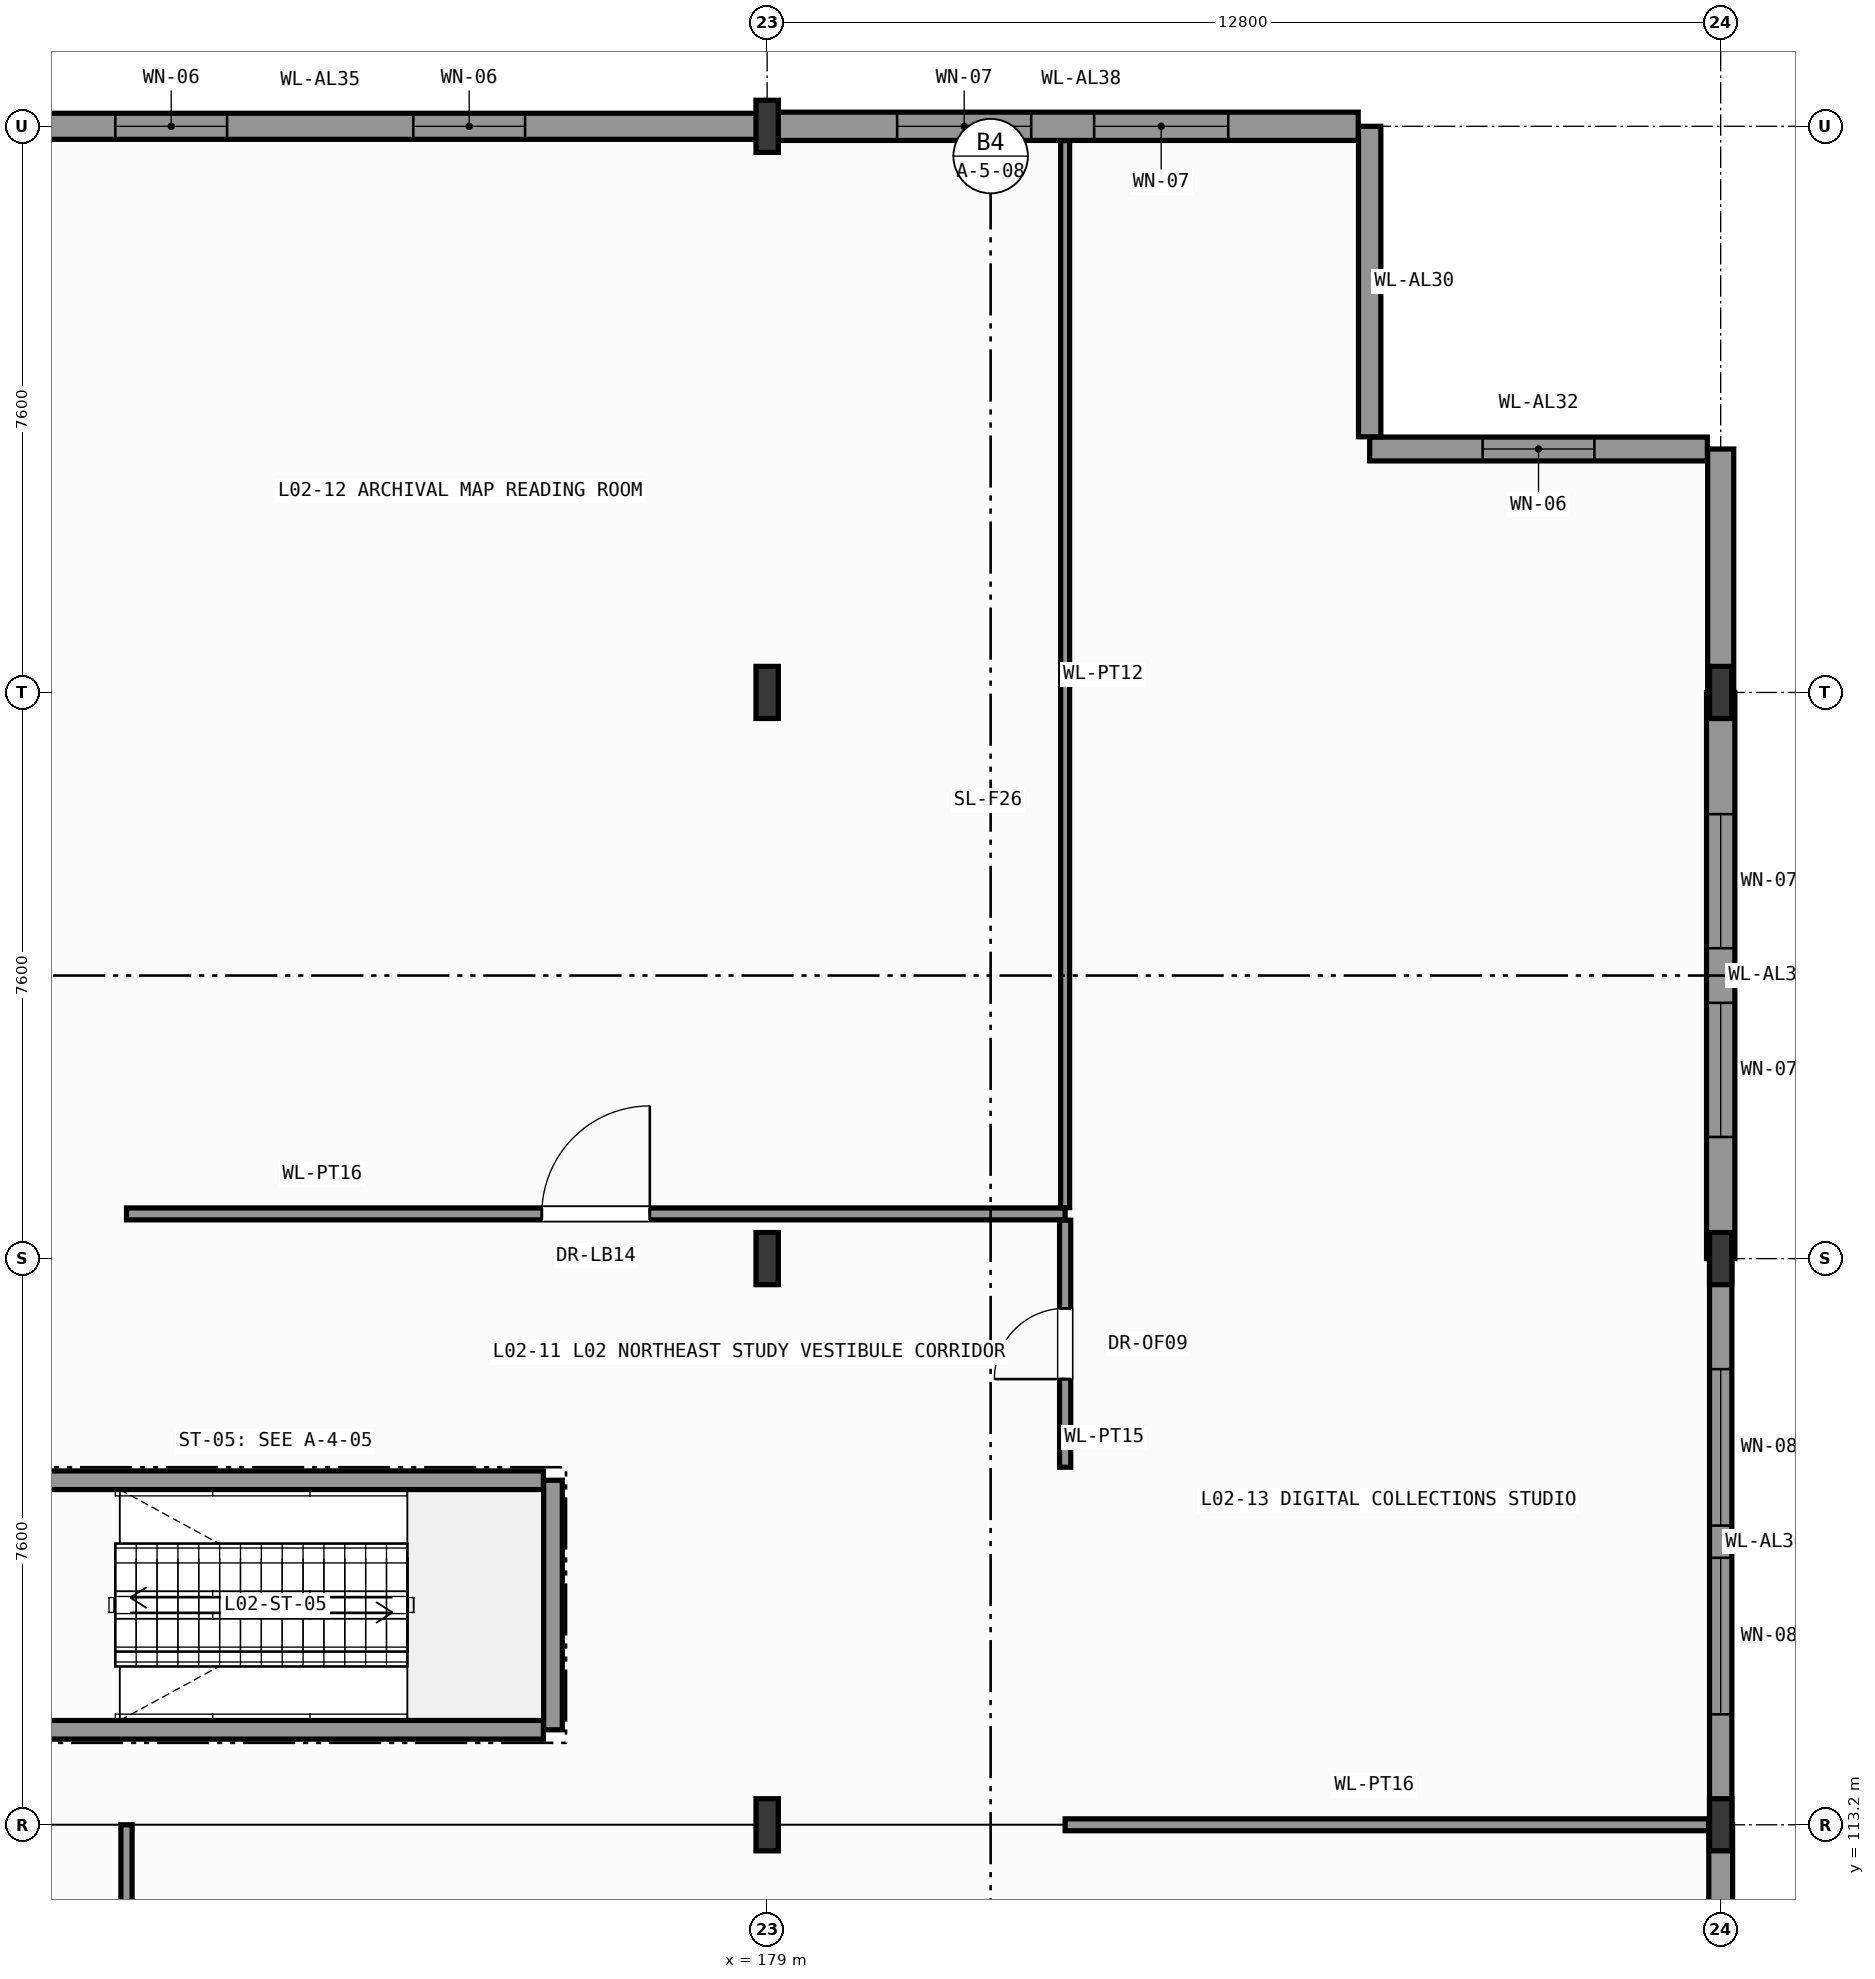
"""IFC4 building model, lengths in metres.
Left out: names, types, materials, properties, quantities, classifications, styles, units other than length and angle.
Written with IfcOpenShell. Run it as: python <this file> out.ifc"""

import sys

from ifc_helpers import new_model, si_unit, direction, frame, frame_2d, origin, origin_2d, place, context, subcontext, project, spatial, rectangle, i_section, extrude, element, fill, save


model = new_model("IFC4")
c1 = context("Model", 3, precision=1e-05, world=origin(), true_north=direction((0.0, 1.0)))
c2 = subcontext(c1, "Body", "Model", "MODEL_VIEW")
j1 = project(units=[si_unit("LENGTHUNIT", "METRE"), si_unit("PLANEANGLEUNIT", "RADIAN")], contexts=[c1])
p1 = place(None, origin())
s1 = spatial("IfcSite", under=j1, at=p1, CompositionType="ELEMENT")
p2 = place(p1, origin())
s2 = spatial("IfcBuilding", under=s1, at=p2, CompositionType="ELEMENT")
p3 = place(p2, frame((0.0, 0.0, 7.8)))
s3 = spatial("IfcBuildingStorey", under=s2, at=p3, CompositionType="ELEMENT", Elevation=7.8)
for number, where, z_axis, x_axis in (
    (1, (179.0, 113.2, 0.0), (0.0, 0.0, 1.0), (1.0, 0.0, 0.0)),
    (2, (179.0, 120.8, 0.0), (0.0, 0.0, 1.0), (1.0, 0.0, 0.0)),
    (3, (179.0, 128.4, 0.0), (0.0, 0.0, 1.0), (1.0, 0.0, 0.0)),
    (4, (179.0, 136.0, 0.0), (0.0, 0.0, 1.0), (1.0, 0.0, 0.0)),
    (5, (191.8, 113.2, 0.0), (0.0, 0.0, 1.0), (1.0, 0.0, 0.0)),
    (6, (191.8, 120.8, 0.0), (0.0, 0.0, 1.0), (1.0, 0.0, 0.0)),
    (7, (191.8, 128.4, 0.0), (0.0, 0.0, 1.0), (1.0, 0.0, 0.0)),
):
    element("IfcColumn", number, at=place(p3, frame(where, z_axis=z_axis, x_axis=x_axis)), inside=s3, PredefinedType="COLUMN", context=c2, shape_type="SweptSolid", body=[
        extrude(i_section(OverallWidth=0.3, OverallDepth=0.7, WebThickness=0.017, FlangeThickness=0.032, FilletRadius=0.027, at=origin_2d()), origin(), (0.0, 0.0, 1.0), 5.4),
    ])
p4 = place(p3, frame((191.8, 113.2, 0.0), z_axis=(0.0, 0.0, 1.0), x_axis=(0.0, -1.0, 0.0)))
e8 = element("IfcWall", 8, at=p4, inside=s3, PredefinedType="SOLIDWALL", context=c2, shape_type="SweptSolid", body=[
    extrude(rectangle(XDim=7.6, YDim=0.32, at=frame_2d((3.8, 0.0))), origin(), (0.0, 0.0, 1.0), 4.815),
])
p5 = place(p4, frame((1.783, 0.0, 0.95)))
e9 = element("IfcOpeningElement", 9, at=p5, cuts=e8, PredefinedType="OPENING", context=c2, shape_type="SweptSolid", body=[
    extrude(rectangle(XDim=1.5, YDim=2.4, at=frame_2d((0.75, 1.2))), frame((0.0, 0.17, 0.0), z_axis=(0.0, -1.0, 0.0), x_axis=(1.0, 0.0, 0.0)), (0.0, 0.0, 1.0), 0.34),
])
p6 = place(p4, frame((4.317, 0.0, 0.95)))
e10 = element("IfcOpeningElement", 10, at=p6, cuts=e8, PredefinedType="OPENING", context=c2, shape_type="SweptSolid", body=[
    extrude(rectangle(XDim=1.5, YDim=2.4, at=frame_2d((0.75, 1.2))), frame((0.0, 0.17, 0.0), z_axis=(0.0, -1.0, 0.0), x_axis=(1.0, 0.0, 0.0)), (0.0, 0.0, 1.0), 0.34),
])
p7 = place(p3, frame((191.8, 120.8, 0.0), z_axis=(0.0, 0.0, 1.0), x_axis=(0.0, -1.0, 0.0)))
e11 = element("IfcWall", 11, at=p7, inside=s3, PredefinedType="SOLIDWALL", context=c2, shape_type="SweptSolid", body=[
    extrude(rectangle(XDim=7.6, YDim=0.3, at=frame_2d((3.8, 0.0))), origin(), (0.0, 0.0, 1.0), 4.815),
])
p8 = place(p7, frame((1.483, 0.0, 0.95)))
e12 = element("IfcOpeningElement", 12, at=p8, cuts=e11, PredefinedType="OPENING", context=c2, shape_type="SweptSolid", body=[
    extrude(rectangle(XDim=2.1, YDim=2.8, at=frame_2d((1.05, 1.4))), frame((0.0, 0.16, 0.0), z_axis=(0.0, -1.0, 0.0), x_axis=(1.0, 0.0, 0.0)), (0.0, 0.0, 1.0), 0.32),
])
p9 = place(p7, frame((4.017, 0.0, 0.95)))
e13 = element("IfcOpeningElement", 13, at=p9, cuts=e11, PredefinedType="OPENING", context=c2, shape_type="SweptSolid", body=[
    extrude(rectangle(XDim=2.1, YDim=2.8, at=frame_2d((1.05, 1.4))), frame((0.0, 0.16, 0.0), z_axis=(0.0, -1.0, 0.0), x_axis=(1.0, 0.0, 0.0)), (0.0, 0.0, 1.0), 0.32),
])
p10 = place(p3, frame((191.8, 128.4, 0.0), z_axis=(0.0, 0.0, 1.0), x_axis=(0.0, -1.0, 0.0)))
e14 = element("IfcWall", 14, at=p10, inside=s3, PredefinedType="SOLIDWALL", context=c2, shape_type="SweptSolid", body=[
    extrude(rectangle(XDim=7.6, YDim=0.38, at=frame_2d((3.8, 0.0))), origin(), (0.0, 0.0, 1.0), 4.815),
])
p11 = place(p10, frame((1.633, 0.0, 0.95)))
e15 = element("IfcOpeningElement", 15, at=p11, cuts=e14, PredefinedType="OPENING", context=c2, shape_type="SweptSolid", body=[
    extrude(rectangle(XDim=1.8, YDim=2.6, at=frame_2d((0.9, 1.3))), frame((0.0, 0.2, 0.0), z_axis=(0.0, -1.0, 0.0), x_axis=(1.0, 0.0, 0.0)), (0.0, 0.0, 1.0), 0.4),
])
p12 = place(p10, frame((4.167, 0.0, 0.95)))
e16 = element("IfcOpeningElement", 16, at=p12, cuts=e14, PredefinedType="OPENING", context=c2, shape_type="SweptSolid", body=[
    extrude(rectangle(XDim=1.8, YDim=2.6, at=frame_2d((0.9, 1.3))), frame((0.0, 0.2, 0.0), z_axis=(0.0, -1.0, 0.0), x_axis=(1.0, 0.0, 0.0)), (0.0, 0.0, 1.0), 0.4),
])
p13 = place(p3, frame((191.8, 131.668, 0.0), z_axis=(0.0, 0.0, 1.0), x_axis=(0.0, -1.0, 0.0)))
e17 = element("IfcWall", 17, at=p13, inside=s3, PredefinedType="SOLIDWALL", context=c2, shape_type="SweptSolid", body=[
    extrude(rectangle(XDim=3.268, YDim=0.35, at=frame_2d((1.634, 0.0))), origin(), (0.0, 0.0, 1.0), 5.15),
])
p14 = place(p3, frame((187.088, 131.668, 0.0), z_axis=(0.0, 0.0, 1.0), x_axis=(1.0, 0.0, 0.0)))
e18 = element("IfcWall", 18, at=p14, inside=s3, PredefinedType="SOLIDWALL", context=c2, shape_type="SweptSolid", body=[
    extrude(rectangle(XDim=4.533, YDim=0.32, at=frame_2d((2.267, 0.0))), origin(), (0.0, 0.0, 1.0), 5.15),
])
p15 = place(p14, frame((1.517, 0.0, 0.95)))
e19 = element("IfcOpeningElement", 19, at=p15, cuts=e18, PredefinedType="OPENING", context=c2, shape_type="SweptSolid", body=[
    extrude(rectangle(XDim=1.5, YDim=2.4, at=frame_2d((0.75, 1.2))), frame((0.0, 0.17, 0.0), z_axis=(0.0, -1.0, 0.0), x_axis=(1.0, 0.0, 0.0)), (0.0, 0.0, 1.0), 0.34),
])
p16 = place(p3, frame((187.088, 136.0, 0.0), z_axis=(0.0, 0.0, 1.0), x_axis=(0.0, -1.0, 0.0)))
e20 = element("IfcWall", 20, at=p16, inside=s3, PredefinedType="SOLIDWALL", context=c2, shape_type="SweptSolid", body=[
    extrude(rectangle(XDim=4.168, YDim=0.3, at=frame_2d((2.084, 0.0))), origin(), (0.0, 0.0, 1.0), 5.15),
])
p17 = place(p3, frame((179.0, 136.0, 0.0), z_axis=(0.0, 0.0, 1.0), x_axis=(1.0, 0.0, 0.0)))
e21 = element("IfcWall", 21, at=p17, inside=s3, PredefinedType="SOLIDWALL", context=c2, shape_type="SweptSolid", body=[
    extrude(rectangle(XDim=7.934, YDim=0.38, at=frame_2d((3.967, 0.0))), origin(), (0.0, 0.0, 1.0), 5.15),
])
p18 = place(p17, frame((1.745, 0.0, 0.95)))
e22 = element("IfcOpeningElement", 22, at=p18, cuts=e21, PredefinedType="OPENING", context=c2, shape_type="SweptSolid", body=[
    extrude(rectangle(XDim=1.8, YDim=2.6, at=frame_2d((0.9, 1.3))), frame((0.0, 0.2, 0.0), z_axis=(0.0, -1.0, 0.0), x_axis=(1.0, 0.0, 0.0)), (0.0, 0.0, 1.0), 0.4),
])
p19 = place(p17, frame((4.389, 0.0, 0.95)))
e23 = element("IfcOpeningElement", 23, at=p19, cuts=e21, PredefinedType="OPENING", context=c2, shape_type="SweptSolid", body=[
    extrude(rectangle(XDim=1.8, YDim=2.6, at=frame_2d((0.9, 1.3))), frame((0.0, 0.2, 0.0), z_axis=(0.0, -1.0, 0.0), x_axis=(1.0, 0.0, 0.0)), (0.0, 0.0, 1.0), 0.4),
])
p20 = place(p3, frame((167.0, 136.0, 0.0), z_axis=(0.0, 0.0, 1.0), x_axis=(1.0, 0.0, 0.0)))
e24 = element("IfcWall", 24, at=p20, inside=s3, PredefinedType="SOLIDWALL", context=c2, shape_type="SweptSolid", body=[
    extrude(rectangle(XDim=12.0, YDim=0.35, at=frame_2d((6.0, 0.0))), origin(), (0.0, 0.0, 1.0), 4.585),
])
p21 = place(p20, frame((3.25, 0.0, 0.95)))
e25 = element("IfcOpeningElement", 25, at=p21, cuts=e24, PredefinedType="OPENING", context=c2, shape_type="SweptSolid", body=[
    extrude(rectangle(XDim=1.5, YDim=2.4, at=frame_2d((0.75, 1.2))), frame((0.0, 0.185, 0.0), z_axis=(0.0, -1.0, 0.0), x_axis=(1.0, 0.0, 0.0)), (0.0, 0.0, 1.0), 0.37),
])
p22 = place(p20, frame((7.25, 0.0, 0.95)))
e26 = element("IfcOpeningElement", 26, at=p22, cuts=e24, PredefinedType="OPENING", context=c2, shape_type="SweptSolid", body=[
    extrude(rectangle(XDim=1.5, YDim=2.4, at=frame_2d((0.75, 1.2))), frame((0.0, 0.185, 0.0), z_axis=(0.0, -1.0, 0.0), x_axis=(1.0, 0.0, 0.0)), (0.0, 0.0, 1.0), 0.37),
])
p23 = place(p3, frame((176.125, 114.475, 0.0), z_axis=(0.0, 0.0, 1.0), x_axis=(0.0, 1.0, 0.0)))
e27 = element("IfcWall", 27, at=p23, inside=s3, PredefinedType="SHEAR", context=c2, shape_type="SweptSolid", body=[
    extrude(rectangle(XDim=3.35, YDim=0.25, at=frame_2d((1.675, 0.0))), origin(), (0.0, 0.0, 1.0), 5.15),
])
for number, where, z_axis, x_axis in (
    (28, (168.804, 114.475, 0.0), (0.0, 0.0, 1.0), (1.0, 0.0, 0.0)),
    (29, (168.804, 117.825, 0.0), (0.0, 0.0, 1.0), (1.0, 0.0, 0.0)),
):
    element("IfcWall", number, at=place(p3, frame(where, z_axis=z_axis, x_axis=x_axis)), inside=s3, PredefinedType="SHEAR", context=c2, shape_type="SweptSolid", body=[
        extrude(rectangle(XDim=7.192, YDim=0.25, at=frame_2d((3.596, 0.0))), origin(), (0.0, 0.0, 1.0), 5.15),
    ])
p24 = place(p3, frame((170.4, 121.4, 0.0), z_axis=(0.0, 0.0, 1.0), x_axis=(1.0, 0.0, 0.0)))
e30 = element("IfcWall", 30, at=p24, inside=s3, PredefinedType="PARTITIONING", context=c2, shape_type="SweptSolid", body=[
    extrude(rectangle(XDim=12.6, YDim=0.16, at=frame_2d((6.3, 0.0))), origin(), (0.0, 0.0, 1.0), 5.15),
])
p25 = place(p24, frame((5.575, 0.0, 0.0)))
e31 = element("IfcOpeningElement", 31, at=p25, cuts=e30, PredefinedType="OPENING", context=c2, shape_type="SweptSolid", body=[
    extrude(rectangle(XDim=1.45, YDim=2.35, at=frame_2d((0.725, 1.175))), frame((0.0, 0.09, 0.0), z_axis=(0.0, -1.0, 0.0), x_axis=(1.0, 0.0, 0.0)), (0.0, 0.0, 1.0), 0.18),
])
p26 = place(p3, frame((183.0, 118.0, 0.0), z_axis=(0.0, 0.0, 1.0), x_axis=(0.0, 1.0, 0.0)))
e32 = element("IfcWall", 32, at=p26, inside=s3, PredefinedType="PARTITIONING", context=c2, shape_type="SweptSolid", body=[
    extrude(rectangle(XDim=3.316, YDim=0.15, at=frame_2d((1.658, 0.0))), origin(), (0.0, 0.0, 1.0), 5.15),
])
p27 = place(p26, frame((1.183, 0.0, 0.0)))
e33 = element("IfcOpeningElement", 33, at=p27, cuts=e32, PredefinedType="OPENING", context=c2, shape_type="SweptSolid", body=[
    extrude(rectangle(XDim=0.95, YDim=2.1, at=frame_2d((0.475, 1.05))), frame((0.0, 0.085, 0.0), z_axis=(0.0, -1.0, 0.0), x_axis=(1.0, 0.0, 0.0)), (0.0, 0.0, 1.0), 0.17),
])
p28 = place(p3, frame((183.0, 121.484, 0.0), z_axis=(0.0, 0.0, 1.0), x_axis=(0.0, 1.0, 0.0)))
e34 = element("IfcWall", 34, at=p28, inside=s3, PredefinedType="PARTITIONING", context=c2, shape_type="SweptSolid", body=[
    extrude(rectangle(XDim=14.322, YDim=0.12, at=frame_2d((7.161, 0.0))), origin(), (0.0, 0.0, 1.0), 5.15),
])
p29 = place(p3, frame((183.0, 113.2, 0.0), z_axis=(0.0, 0.0, 1.0), x_axis=(1.0, 0.0, 0.0)))
e35 = element("IfcWall", 35, at=p29, inside=s3, PredefinedType="PARTITIONING", context=c2, shape_type="SweptSolid", body=[
    extrude(rectangle(XDim=8.636, YDim=0.16, at=frame_2d((4.318, 0.0))), origin(), (0.0, 0.0, 1.0), 3.705),
])
p30 = place(p3, frame((170.4, 86.884, 0.0), z_axis=(0.0, 0.0, 1.0), x_axis=(0.0, 1.0, 0.0)))
e36 = element("IfcWall", 36, at=p30, inside=s3, PredefinedType="PARTITIONING", context=c2, shape_type="SweptSolid", body=[
    extrude(rectangle(XDim=26.316, YDim=0.15, at=frame_2d((13.158, 0.0))), origin(), (0.0, 0.0, 1.0), 5.15),
])
p31 = place(p30, frame((12.633, 0.0, 0.0)))
e37 = element("IfcOpeningElement", 37, at=p31, cuts=e36, PredefinedType="OPENING", context=c2, shape_type="SweptSolid", body=[
    extrude(rectangle(XDim=1.05, YDim=2.2, at=frame_2d((0.525, 1.1))), frame((0.0, 0.085, 0.0), z_axis=(0.0, -1.0, 0.0), x_axis=(1.0, 0.0, 0.0)), (0.0, 0.0, 1.0), 0.17),
])
p32 = place(p8, origin())
e38 = element("IfcWindow", 38, at=p32, inside=s3, PartitioningType="SINGLE_PANEL", PredefinedType="WINDOW", context=c2, shape_type="SweptSolid", body=[
    extrude(rectangle(XDim=2.1, YDim=2.8, at=frame_2d((1.05, 1.4))), frame((0.0, 0.03, 0.0), z_axis=(0.0, -1.0, 0.0), x_axis=(1.0, 0.0, 0.0)), (0.0, 0.0, 1.0), 0.06),
])
fill(e12, e38)
p33 = place(p9, origin())
e39 = element("IfcWindow", 39, at=p33, inside=s3, PartitioningType="SINGLE_PANEL", PredefinedType="WINDOW", context=c2, shape_type="SweptSolid", body=[
    extrude(rectangle(XDim=2.1, YDim=2.8, at=frame_2d((1.05, 1.4))), frame((0.0, 0.03, 0.0), z_axis=(0.0, -1.0, 0.0), x_axis=(1.0, 0.0, 0.0)), (0.0, 0.0, 1.0), 0.06),
])
fill(e13, e39)
p34 = place(p11, origin())
e40 = element("IfcWindow", 40, at=p34, inside=s3, PartitioningType="SINGLE_PANEL", PredefinedType="WINDOW", context=c2, shape_type="SweptSolid", body=[
    extrude(rectangle(XDim=1.8, YDim=2.6, at=frame_2d((0.9, 1.3))), frame((0.0, 0.03, 0.0), z_axis=(0.0, -1.0, 0.0), x_axis=(1.0, 0.0, 0.0)), (0.0, 0.0, 1.0), 0.06),
])
fill(e15, e40)
p35 = place(p12, origin())
e41 = element("IfcWindow", 41, at=p35, inside=s3, PartitioningType="SINGLE_PANEL", PredefinedType="WINDOW", context=c2, shape_type="SweptSolid", body=[
    extrude(rectangle(XDim=1.8, YDim=2.6, at=frame_2d((0.9, 1.3))), frame((0.0, 0.03, 0.0), z_axis=(0.0, -1.0, 0.0), x_axis=(1.0, 0.0, 0.0)), (0.0, 0.0, 1.0), 0.06),
])
fill(e16, e41)
p36 = place(p15, origin())
e42 = element("IfcWindow", 42, at=p36, inside=s3, PartitioningType="SINGLE_PANEL", PredefinedType="WINDOW", context=c2, shape_type="SweptSolid", body=[
    extrude(rectangle(XDim=1.5, YDim=2.4, at=frame_2d((0.75, 1.2))), frame((0.0, 0.03, 0.0), z_axis=(0.0, -1.0, 0.0), x_axis=(1.0, 0.0, 0.0)), (0.0, 0.0, 1.0), 0.06),
])
fill(e19, e42)
p37 = place(p18, origin())
e43 = element("IfcWindow", 43, at=p37, inside=s3, PartitioningType="SINGLE_PANEL", PredefinedType="WINDOW", context=c2, shape_type="SweptSolid", body=[
    extrude(rectangle(XDim=1.8, YDim=2.6, at=frame_2d((0.9, 1.3))), frame((0.0, 0.03, 0.0), z_axis=(0.0, -1.0, 0.0), x_axis=(1.0, 0.0, 0.0)), (0.0, 0.0, 1.0), 0.06),
])
fill(e22, e43)
p38 = place(p19, origin())
e44 = element("IfcWindow", 44, at=p38, inside=s3, PartitioningType="SINGLE_PANEL", PredefinedType="WINDOW", context=c2, shape_type="SweptSolid", body=[
    extrude(rectangle(XDim=1.8, YDim=2.6, at=frame_2d((0.9, 1.3))), frame((0.0, 0.03, 0.0), z_axis=(0.0, -1.0, 0.0), x_axis=(1.0, 0.0, 0.0)), (0.0, 0.0, 1.0), 0.06),
])
fill(e23, e44)
p39 = place(p21, origin())
e45 = element("IfcWindow", 45, at=p39, inside=s3, PartitioningType="SINGLE_PANEL", PredefinedType="WINDOW", context=c2, shape_type="SweptSolid", body=[
    extrude(rectangle(XDim=1.5, YDim=2.4, at=frame_2d((0.75, 1.2))), frame((0.0, 0.03, 0.0), z_axis=(0.0, -1.0, 0.0), x_axis=(1.0, 0.0, 0.0)), (0.0, 0.0, 1.0), 0.06),
])
fill(e25, e45)
p40 = place(p22, origin())
e46 = element("IfcWindow", 46, at=p40, inside=s3, PartitioningType="SINGLE_PANEL", PredefinedType="WINDOW", context=c2, shape_type="SweptSolid", body=[
    extrude(rectangle(XDim=1.5, YDim=2.4, at=frame_2d((0.75, 1.2))), frame((0.0, 0.03, 0.0), z_axis=(0.0, -1.0, 0.0), x_axis=(1.0, 0.0, 0.0)), (0.0, 0.0, 1.0), 0.06),
])
fill(e26, e46)
p41 = place(p25, origin())
e47 = element("IfcDoor", 47, at=p41, inside=s3, OperationType="SINGLE_SWING_RIGHT", PredefinedType="DOOR", context=c2, shape_type="SweptSolid", body=[
    extrude(rectangle(XDim=1.45, YDim=2.35, at=frame_2d((0.725, 1.175))), frame((0.0, 0.025, 0.0), z_axis=(0.0, -1.0, 0.0), x_axis=(1.0, 0.0, 0.0)), (0.0, 0.0, 1.0), 0.05),
])
fill(e31, e47)
p42 = place(p27, origin())
e48 = element("IfcDoor", 48, at=p42, inside=s3, OperationType="SINGLE_SWING_LEFT", PredefinedType="DOOR", context=c2, shape_type="SweptSolid", body=[
    extrude(rectangle(XDim=0.95, YDim=2.1, at=frame_2d((0.475, 1.05))), frame((0.0, 0.025, 0.0), z_axis=(0.0, -1.0, 0.0), x_axis=(1.0, 0.0, 0.0)), (0.0, 0.0, 1.0), 0.05),
])
fill(e33, e48)
save(model, sys.argv[1])
